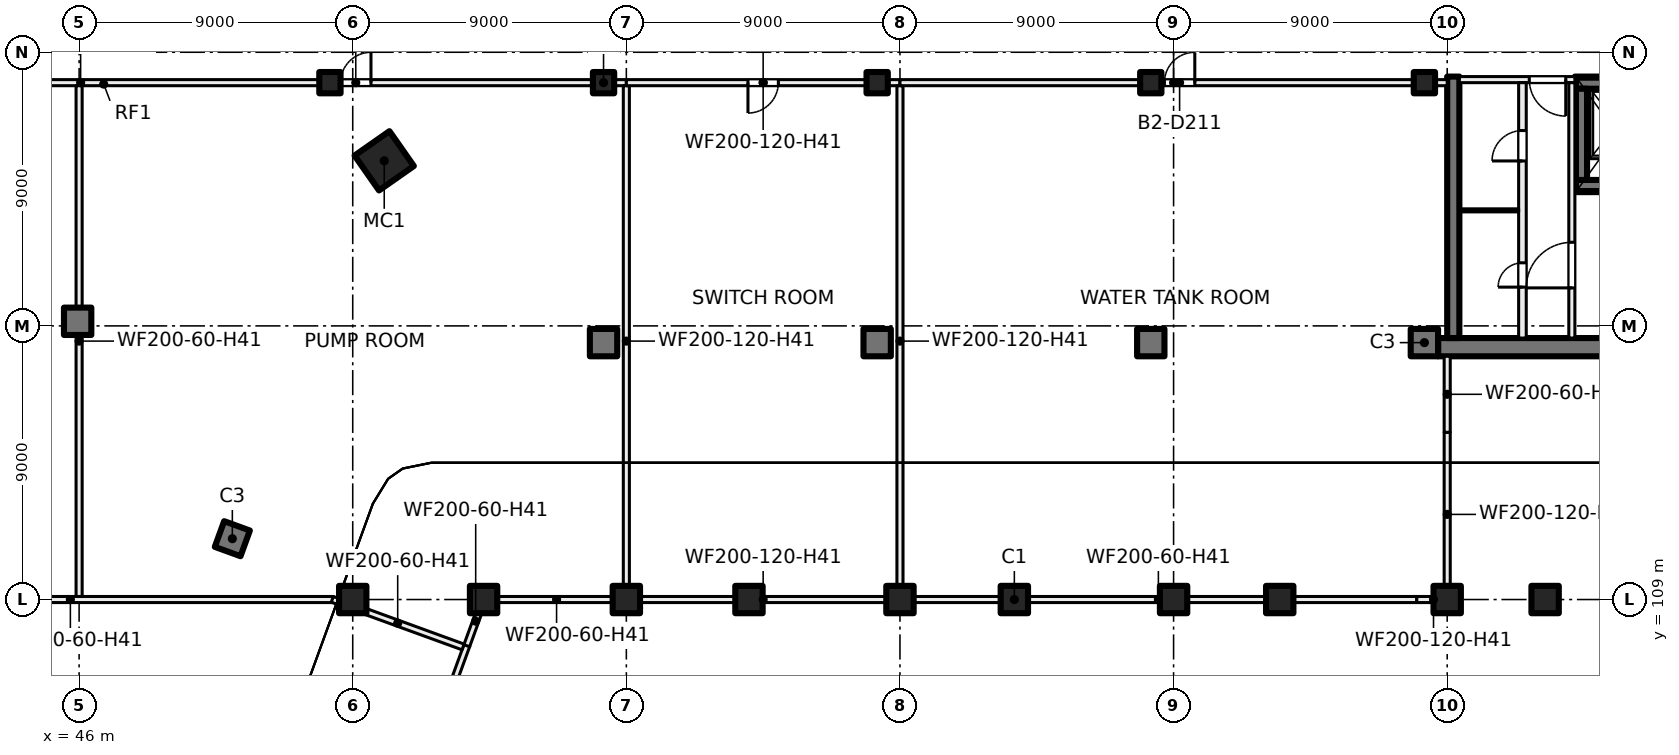
"""IFC4 building model, lengths in metres.
Left out: names, types, materials, properties, quantities, classifications, styles, units other than length and angle.
Written with IfcOpenShell. Run it as: python <this file> out.ifc"""

import sys

from ifc_helpers import new_model, si_unit, direction, frame, frame_2d, origin, origin_2d, place, context, subcontext, project, spatial, rectangle, hollow_rectangle, extrude, element, fill, save


model = new_model("IFC4")
c1 = context("Model", 3, precision=1e-05, world=origin(), true_north=direction((0.0, 1.0)))
c2 = subcontext(c1, "Body", "Model", "MODEL_VIEW")
j1 = project(units=[si_unit("LENGTHUNIT", "METRE"), si_unit("PLANEANGLEUNIT", "RADIAN")], contexts=[c1])
p1 = place(None, origin())
s1 = spatial("IfcSite", under=j1, at=p1, CompositionType="ELEMENT")
p2 = place(p1, origin())
s2 = spatial("IfcBuilding", under=s1, at=p2, CompositionType="ELEMENT")
p3 = place(p2, frame((0.0, 0.0, -9.0)))
s3 = spatial("IfcBuildingStorey", under=s2, at=p3, CompositionType="ELEMENT", Elevation=-9.0)
for number, where, z_axis, x_axis in (
    (1, (55.0, 109.0, 0.0), (0.0, 0.0, 1.0), (1.0, 0.0, 0.0)),
    (2, (64.0, 109.0, 0.0), (0.0, 0.0, 1.0), (1.0, 0.0, 0.0)),
    (3, (73.0, 109.0, 0.0), (0.0, 0.0, 1.0), (1.0, 0.0, 0.0)),
    (4, (82.0, 109.0, 0.0), (0.0, 0.0, 1.0), (1.0, 0.0, 0.0)),
    (5, (91.0, 109.0, 0.0), (0.0, 0.0, 1.0), (1.0, 0.0, 0.0)),
    (6, (59.304, 109.0, 0.0), (0.0, 0.0, 1.0), (1.0, 0.0, 0.0)),
    (7, (68.033, 109.0, 0.0), (0.0, 0.0, 1.0), (1.0, 0.0, 0.0)),
    (8, (76.762, 109.0, 0.0), (0.0, 0.0, 1.0), (1.0, 0.0, 0.0)),
    (9, (85.491, 109.0, 0.0), (0.0, 0.0, 1.0), (1.0, 0.0, 0.0)),
    (10, (94.221, 109.0, 0.0), (0.0, 0.0, 1.0), (1.0, 0.0, 0.0)),
):
    element("IfcColumn", number, at=place(p3, frame(where, z_axis=z_axis, x_axis=x_axis)), inside=s3, PredefinedType="COLUMN", context=c2, shape_type="SweptSolid", body=[
        extrude(rectangle(XDim=0.9, YDim=0.9, at=origin_2d()), origin(), (0.0, 0.0, 1.0), 4.5),
    ])
p4 = place(p3, frame((56.036, 123.43, 0.0), z_axis=(0.0, 0.0, 1.0), x_axis=(0.573576436351, -0.819152044289, 0.0)))
e11 = element("IfcColumn", 11, at=p4, inside=s3, PredefinedType="COLUMN", context=c2, shape_type="SweptSolid", body=[
    extrude(hollow_rectangle(XDim=1.4, YDim=1.4, WallThickness=0.04, at=origin_2d()), origin(), (0.0, 0.0, 1.0), 4.5),
])
for number, where, z_axis, x_axis in (
    (12, (54.25, 126.0, 0.0), (0.0, 0.0, 1.0), (1.0, 0.0, 0.0)),
    (13, (63.25, 126.0, 0.0), (0.0, 0.0, 1.0), (1.0, 0.0, 0.0)),
    (14, (72.25, 126.0, 0.0), (0.0, 0.0, 1.0), (1.0, 0.0, 0.0)),
    (15, (81.25, 126.0, 0.0), (0.0, 0.0, 1.0), (1.0, 0.0, 0.0)),
    (16, (90.25, 126.0, 0.0), (0.0, 0.0, 1.0), (1.0, 0.0, 0.0)),
):
    element("IfcColumn", number, at=place(p3, frame(where, z_axis=z_axis, x_axis=x_axis)), inside=s3, PredefinedType="COLUMN", context=c2, shape_type="SweptSolid", body=[
        extrude(rectangle(XDim=0.7, YDim=0.7, at=origin_2d()), origin(), (0.0, 0.0, 1.0), 4.5),
    ])
for number, where, z_axis, x_axis in (
    (17, (45.952, 118.152, 0.0), (0.0, 0.0, 1.0), (1.0, 0.0, 0.0)),
    (18, (63.25, 117.45, 0.0), (0.0, 0.0, 1.0), (1.0, 0.0, 0.0)),
    (19, (72.25, 117.45, 0.0), (0.0, 0.0, 1.0), (1.0, 0.0, 0.0)),
    (20, (81.25, 117.45, 0.0), (0.0, 0.0, 1.0), (1.0, 0.0, 0.0)),
    (21, (90.25, 117.45, 0.0), (0.0, 0.0, 1.0), (1.0, 0.0, 0.0)),
    (22, (51.04, 111.001, 0.0), (0.0, 0.0, 1.0), (-0.342, -0.94, 0.0)),
):
    element("IfcColumn", number, at=place(p3, frame(where, z_axis=z_axis, x_axis=x_axis)), inside=s3, PredefinedType="COLUMN", context=c2, shape_type="SweptSolid", body=[
        extrude(rectangle(XDim=0.9, YDim=0.9, at=origin_2d()), origin(), (0.0, 0.0, 1.0), 4.5),
    ])
p5 = place(p3, frame((99.6, 117.3, 0.0), z_axis=(0.0, 0.0, 1.0), x_axis=(-1.0, 0.0, 0.0)))
e23 = element("IfcWall", 23, at=p5, inside=s3, PredefinedType="SHEAR", context=c2, shape_type="SweptSolid", body=[
    extrude(rectangle(XDim=8.9, YDim=0.6, at=frame_2d((4.45, 0.0))), origin(), (0.0, 0.0, 1.0), 4.5),
])
p6 = place(p3, frame((107.4, 126.0, 0.0), z_axis=(0.0, 0.0, 1.0), x_axis=(-1.0, 0.0, 0.0)))
e24 = element("IfcWall", 24, at=p6, inside=s3, PredefinedType="SHEAR", context=c2, shape_type="SweptSolid", body=[
    extrude(rectangle(XDim=12.2, YDim=0.4, at=frame_2d((6.1, 0.0))), origin(), (0.0, 0.0, 1.0), 4.5),
])
p7 = place(p6, frame((10.25, 0.0, 0.0)))
e25 = element("IfcOpeningElement", 25, at=p7, cuts=e24, PredefinedType="OPENING", context=c2, shape_type="SweptSolid", body=[
    extrude(rectangle(XDim=1.1, YDim=2.1, at=frame_2d((0.55, 1.05))), frame((0.0, 0.21, 0.0), z_axis=(0.0, -1.0, 0.0), x_axis=(1.0, 0.0, 0.0)), (0.0, 0.0, 1.0), 0.42),
])
p8 = place(p6, frame((0.7, 0.0, 0.0)))
e26 = element("IfcOpeningElement", 26, at=p8, cuts=e24, PredefinedType="OPENING", context=c2, shape_type="SweptSolid", body=[
    extrude(rectangle(XDim=0.8, YDim=2.1, at=frame_2d((0.4, 1.05))), frame((0.0, 0.21, 0.0), z_axis=(0.0, -1.0, 0.0), x_axis=(1.0, 0.0, 0.0)), (0.0, 0.0, 1.0), 0.42),
])
p9 = place(p6, frame((5.6, 0.0, 0.0)))
e27 = element("IfcOpeningElement", 27, at=p9, cuts=e24, PredefinedType="OPENING", context=c2, shape_type="SweptSolid", body=[
    extrude(rectangle(XDim=0.8, YDim=2.1, at=frame_2d((0.4, 1.05))), frame((0.0, 0.21, 0.0), z_axis=(0.0, -1.0, 0.0), x_axis=(1.0, 0.0, 0.0)), (0.0, 0.0, 1.0), 0.42),
])
p10 = place(p3, frame((107.4, 122.6, 0.0), z_axis=(0.0, 0.0, 1.0), x_axis=(-1.0, 0.0, 0.0)))
e28 = element("IfcWall", 28, at=p10, inside=s3, PredefinedType="SHEAR", context=c2, shape_type="SweptSolid", body=[
    extrude(rectangle(XDim=12.2, YDim=0.4, at=frame_2d((6.1, 0.0))), origin(), (0.0, 0.0, 1.0), 4.5),
])
p11 = place(p3, frame((95.4, 125.8, 0.0), z_axis=(0.0, 0.0, 1.0), x_axis=(0.0, -1.0, 0.0)))
e29 = element("IfcWall", 29, at=p11, inside=s3, PredefinedType="SHEAR", context=c2, shape_type="SweptSolid", body=[
    extrude(rectangle(XDim=3.0, YDim=0.4, at=frame_2d((1.5, 0.0))), origin(), (0.0, 0.0, 1.0), 4.5),
])
p12 = place(p3, frame((91.2, 126.2, 0.0), z_axis=(0.0, 0.0, 1.0), x_axis=(0.0, -1.0, 0.0)))
e30 = element("IfcWall", 30, at=p12, inside=s3, PredefinedType="SHEAR", context=c2, shape_type="SweptSolid", body=[
    extrude(rectangle(XDim=8.6, YDim=0.4, at=frame_2d((4.3, 0.0))), origin(), (0.0, 0.0, 1.0), 4.5),
])
p13 = place(p3, frame((95.2, 126.1, 0.0), z_axis=(0.0, 0.0, 1.0), x_axis=(-1.0, 0.0, 0.0)))
e31 = element("IfcWall", 31, at=p13, inside=s3, PredefinedType="PARTITIONING", context=c2, shape_type="SweptSolid", body=[
    extrude(rectangle(XDim=3.8, YDim=0.2, at=frame_2d((1.9, 0.0))), origin(), (0.0, 0.0, 1.0), 4.125),
])
p14 = place(p13, frame((0.3, 0.0, 0.0)))
e32 = element("IfcOpeningElement", 32, at=p14, cuts=e31, PredefinedType="OPENING", context=c2, shape_type="SweptSolid", body=[
    extrude(rectangle(XDim=1.2, YDim=2.1, at=frame_2d((0.6, 1.05))), frame((0.0, 0.11, 0.0), z_axis=(0.0, -1.0, 0.0), x_axis=(1.0, 0.0, 0.0)), (0.0, 0.0, 1.0), 0.22),
])
p15 = place(p3, frame((95.1, 117.6, 0.0), z_axis=(0.0, 0.0, 1.0), x_axis=(0.0, 1.0, 0.0)))
e33 = element("IfcWall", 33, at=p15, inside=s3, PredefinedType="PARTITIONING", context=c2, shape_type="SweptSolid", body=[
    extrude(rectangle(XDim=8.4, YDim=0.2, at=frame_2d((4.2, 0.0))), origin(), (0.0, 0.0, 1.0), 4.125),
])
p16 = place(p15, frame((1.65, 0.0, 0.0)))
e34 = element("IfcOpeningElement", 34, at=p16, cuts=e33, PredefinedType="OPENING", context=c2, shape_type="SweptSolid", body=[
    extrude(rectangle(XDim=1.5, YDim=2.1, at=frame_2d((0.75, 1.05))), frame((0.0, 0.11, 0.0), z_axis=(0.0, -1.0, 0.0), x_axis=(1.0, 0.0, 0.0)), (0.0, 0.0, 1.0), 0.22),
])
p17 = place(p3, frame((93.475, 117.6, 0.0), z_axis=(0.0, 0.0, 1.0), x_axis=(0.0, 1.0, 0.0)))
e35 = element("IfcWall", 35, at=p17, inside=s3, PredefinedType="PARTITIONING", context=c2, shape_type="SweptSolid", body=[
    extrude(rectangle(XDim=8.4, YDim=0.25, at=frame_2d((4.2, 0.0))), origin(), (0.0, 0.0, 1.0), 4.125),
])
p18 = place(p17, frame((5.825, 0.0, 0.0)))
e36 = element("IfcOpeningElement", 36, at=p18, cuts=e35, PredefinedType="OPENING", context=c2, shape_type="SweptSolid", body=[
    extrude(rectangle(XDim=1.0, YDim=2.1, at=frame_2d((0.5, 1.05))), frame((0.0, 0.135, 0.0), z_axis=(0.0, -1.0, 0.0), x_axis=(1.0, 0.0, 0.0)), (0.0, 0.0, 1.0), 0.27),
])
p19 = place(p17, frame((1.675, 0.0, 0.0)))
e37 = element("IfcOpeningElement", 37, at=p19, cuts=e35, PredefinedType="OPENING", context=c2, shape_type="SweptSolid", body=[
    extrude(rectangle(XDim=0.8, YDim=2.1, at=frame_2d((0.4, 1.05))), frame((0.0, 0.135, 0.0), z_axis=(0.0, -1.0, 0.0), x_axis=(1.0, 0.0, 0.0)), (0.0, 0.0, 1.0), 0.27),
])
p20 = place(p3, frame((93.35, 121.8, 0.0), z_axis=(0.0, 0.0, 1.0), x_axis=(-1.0, 0.0, 0.0)))
e38 = element("IfcWall", 38, at=p20, inside=s3, PredefinedType="PARTITIONING", context=c2, shape_type="SweptSolid", body=[
    extrude(rectangle(XDim=1.95, YDim=0.1, at=frame_2d((0.975, 0.0))), origin(), (0.0, 0.0, 1.0), 4.125),
])
p21 = place(p3, frame((64.0, 126.0, 0.0), z_axis=(0.0, 0.0, 1.0), x_axis=(-1.0, 0.0, 0.0)))
e39 = element("IfcWall", 39, at=p21, inside=s3, PredefinedType="PARTITIONING", context=c2, shape_type="SweptSolid", body=[
    extrude(rectangle(XDim=35.9, YDim=0.2, at=frame_2d((17.95, 0.0))), origin(), (0.0, 0.0, 1.0), 4.125),
])
p22 = place(p21, frame((23.498, 0.0, 0.0)))
e40 = element("IfcOpeningElement", 40, at=p22, cuts=e39, PredefinedType="OPENING", context=c2, shape_type="SweptSolid", body=[
    extrude(rectangle(XDim=1.0, YDim=2.1, at=frame_2d((0.5, 1.05))), frame((0.0, 0.11, 0.0), z_axis=(0.0, -1.0, 0.0), x_axis=(1.0, 0.0, 0.0)), (0.0, 0.0, 1.0), 0.22),
])
p23 = place(p21, frame((8.4, 0.0, 0.0)))
e41 = element("IfcOpeningElement", 41, at=p23, cuts=e39, PredefinedType="OPENING", context=c2, shape_type="SweptSolid", body=[
    extrude(rectangle(XDim=1.0, YDim=2.1, at=frame_2d((0.5, 1.05))), frame((0.0, 0.11, 0.0), z_axis=(0.0, -1.0, 0.0), x_axis=(1.0, 0.0, 0.0)), (0.0, 0.0, 1.0), 0.22),
])
p24 = place(p3, frame((37.062, 109.0, 0.0), z_axis=(0.0, 0.0, 1.0), x_axis=(1.0, 0.0, 0.0)))
e42 = element("IfcWall", 42, at=p24, inside=s3, PredefinedType="PARTITIONING", context=c2, shape_type="SweptSolid", body=[
    extrude(rectangle(XDim=17.301, YDim=0.2, at=frame_2d((8.65, 0.0))), origin(), (0.0, 0.0, 1.0), 4.125),
])
p25 = place(p3, frame((46.0, 109.1, 0.0), z_axis=(0.0, 0.0, 1.0), x_axis=(0.0, 1.0, 0.0)))
e43 = element("IfcWall", 43, at=p25, inside=s3, PredefinedType="PARTITIONING", context=c2, shape_type="SweptSolid", body=[
    extrude(rectangle(XDim=16.8, YDim=0.2, at=frame_2d((8.4, 0.0))), origin(), (0.0, 0.0, 1.0), 4.125),
])
p26 = place(p3, frame((54.0, 94.429, 0.0), z_axis=(0.0, 0.0, 1.0), x_axis=(0.342057301943, 0.939679095323, 0.0)))
e44 = element("IfcWall", 44, at=p26, inside=s3, PredefinedType="PARTITIONING", context=c2, shape_type="SweptSolid", body=[
    extrude(rectangle(XDim=13.91, YDim=0.2, at=frame_2d((6.955, 0.0))), origin(), (0.0, 0.0, 1.0), 4.125),
])
p27 = place(p3, frame((54.328, 109.006, 0.0), z_axis=(0.0, 0.0, 1.0), x_axis=(0.939667244136, -0.342089857053, 0.0)))
e45 = element("IfcWall", 45, at=p27, inside=s3, PredefinedType="PARTITIONING", context=c2, shape_type="SweptSolid", body=[
    extrude(rectangle(XDim=4.578, YDim=0.2, at=frame_2d((2.289, 0.0))), origin(), (0.0, 0.0, 1.0), 4.125),
])
p28 = place(p3, frame((58.751, 107.481, 0.0), z_axis=(0.0, 0.0, 1.0), x_axis=(0.341925778056, 0.93972696157, 0.0)))
e46 = element("IfcWall", 46, at=p28, inside=s3, PredefinedType="PARTITIONING", context=c2, shape_type="SweptSolid", body=[
    extrude(rectangle(XDim=1.717, YDim=0.2, at=frame_2d((0.858, 0.0))), origin(), (0.0, 0.0, 1.0), 4.125),
])
p29 = place(p3, frame((59.41, 109.0, 0.0), z_axis=(0.0, 0.0, 1.0), x_axis=(1.0, 0.0, 0.0)))
e47 = element("IfcWall", 47, at=p29, inside=s3, PredefinedType="PARTITIONING", context=c2, shape_type="SweptSolid", body=[
    extrude(rectangle(XDim=4.59, YDim=0.2, at=frame_2d((2.295, 0.0))), origin(), (0.0, 0.0, 1.0), 4.125),
])
p30 = place(p3, frame((64.0, 109.1, 0.0), z_axis=(0.0, 0.0, 1.0), x_axis=(0.0, 1.0, 0.0)))
e48 = element("IfcWall", 48, at=p30, inside=s3, PredefinedType="PARTITIONING", context=c2, shape_type="SweptSolid", body=[
    extrude(rectangle(XDim=16.8, YDim=0.2, at=frame_2d((8.4, 0.0))), origin(), (0.0, 0.0, 1.0), 4.125),
])
p31 = place(p3, frame((64.0, 109.0, 0.0), z_axis=(0.0, 0.0, 1.0), x_axis=(1.0, 0.0, 0.0)))
e49 = element("IfcWall", 49, at=p31, inside=s3, PredefinedType="PARTITIONING", context=c2, shape_type="SweptSolid", body=[
    extrude(rectangle(XDim=9.0, YDim=0.2, at=frame_2d((4.5, 0.0))), origin(), (0.0, 0.0, 1.0), 4.125),
])
p32 = place(p3, frame((73.0, 126.0, 0.0), z_axis=(0.0, 0.0, 1.0), x_axis=(-1.0, 0.0, 0.0)))
e50 = element("IfcWall", 50, at=p32, inside=s3, PredefinedType="PARTITIONING", context=c2, shape_type="SweptSolid", body=[
    extrude(rectangle(XDim=9.0, YDim=0.2, at=frame_2d((4.5, 0.0))), origin(), (0.0, 0.0, 1.0), 4.125),
])
p33 = place(p32, frame((4.0, 0.0, 0.0)))
e51 = element("IfcOpeningElement", 51, at=p33, cuts=e50, PredefinedType="OPENING", context=c2, shape_type="SweptSolid", body=[
    extrude(rectangle(XDim=1.0, YDim=2.1, at=frame_2d((0.5, 1.05))), frame((0.0, 0.11, 0.0), z_axis=(0.0, -1.0, 0.0), x_axis=(1.0, 0.0, 0.0)), (0.0, 0.0, 1.0), 0.22),
])
p34 = place(p3, frame((73.0, 109.1, 0.0), z_axis=(0.0, 0.0, 1.0), x_axis=(0.0, 1.0, 0.0)))
e52 = element("IfcWall", 52, at=p34, inside=s3, PredefinedType="PARTITIONING", context=c2, shape_type="SweptSolid", body=[
    extrude(rectangle(XDim=16.8, YDim=0.2, at=frame_2d((8.4, 0.0))), origin(), (0.0, 0.0, 1.0), 4.125),
])
p35 = place(p3, frame((73.0, 109.0, 0.0), z_axis=(0.0, 0.0, 1.0), x_axis=(1.0, 0.0, 0.0)))
e53 = element("IfcWall", 53, at=p35, inside=s3, PredefinedType="PARTITIONING", context=c2, shape_type="SweptSolid", body=[
    extrude(rectangle(XDim=17.0, YDim=0.2, at=frame_2d((8.5, 0.0))), origin(), (0.0, 0.0, 1.0), 4.125),
])
p36 = place(p3, frame((91.0, 126.0, 0.0), z_axis=(0.0, 0.0, 1.0), x_axis=(-1.0, 0.0, 0.0)))
e54 = element("IfcWall", 54, at=p36, inside=s3, PredefinedType="PARTITIONING", context=c2, shape_type="SweptSolid", body=[
    extrude(rectangle(XDim=18.0, YDim=0.2, at=frame_2d((9.0, 0.0))), origin(), (0.0, 0.0, 1.0), 4.125),
])
p37 = place(p36, frame((8.302, 0.0, 0.0)))
e55 = element("IfcOpeningElement", 55, at=p37, cuts=e54, PredefinedType="OPENING", context=c2, shape_type="SweptSolid", body=[
    extrude(rectangle(XDim=1.0, YDim=2.1, at=frame_2d((0.5, 1.05))), frame((0.0, 0.11, 0.0), z_axis=(0.0, -1.0, 0.0), x_axis=(1.0, 0.0, 0.0)), (0.0, 0.0, 1.0), 0.22),
])
p38 = place(p3, frame((90.0, 109.0, 0.0), z_axis=(0.0, 0.0, 1.0), x_axis=(1.0, 0.0, 0.0)))
e56 = element("IfcWall", 56, at=p38, inside=s3, PredefinedType="PARTITIONING", context=c2, shape_type="SweptSolid", body=[
    extrude(rectangle(XDim=1.1, YDim=0.2, at=frame_2d((0.55, 0.0))), origin(), (0.0, 0.0, 1.0), 4.125),
])
p39 = place(p3, frame((91.0, 109.1, 0.0), z_axis=(0.0, 0.0, 1.0), x_axis=(0.0, 1.0, 0.0)))
e57 = element("IfcWall", 57, at=p39, inside=s3, PredefinedType="PARTITIONING", context=c2, shape_type="SweptSolid", body=[
    extrude(rectangle(XDim=5.4, YDim=0.2, at=frame_2d((2.7, 0.0))), origin(), (0.0, 0.0, 1.0), 4.125),
])
p40 = place(p3, frame((91.0, 114.5, 0.0), z_axis=(0.0, 0.0, 1.0), x_axis=(0.0, 1.0, 0.0)))
e58 = element("IfcWall", 58, at=p40, inside=s3, PredefinedType="PARTITIONING", context=c2, shape_type="SweptSolid", body=[
    extrude(rectangle(XDim=2.5, YDim=0.2, at=frame_2d((1.25, 0.0))), origin(), (0.0, 0.0, 1.0), 4.125),
])
p41 = place(p14, origin())
e59 = element("IfcDoor", 59, at=p41, inside=s3, OperationType="DOUBLE_DOOR_SINGLE_SWING", PredefinedType="DOOR", context=c2, shape_type="SweptSolid", body=[
    extrude(rectangle(XDim=1.2, YDim=2.1, at=frame_2d((0.6, 1.05))), frame((0.0, 0.025, 0.0), z_axis=(0.0, -1.0, 0.0), x_axis=(1.0, 0.0, 0.0)), (0.0, 0.0, 1.0), 0.05),
])
fill(e32, e59)
p42 = place(p16, origin())
e60 = element("IfcDoor", 60, at=p42, inside=s3, OperationType="DOUBLE_DOOR_SINGLE_SWING", PredefinedType="DOOR", context=c2, shape_type="SweptSolid", body=[
    extrude(rectangle(XDim=1.5, YDim=2.1, at=frame_2d((0.75, 1.05))), frame((0.0, 0.025, 0.0), z_axis=(0.0, -1.0, 0.0), x_axis=(1.0, 0.0, 0.0)), (0.0, 0.0, 1.0), 0.05),
])
fill(e34, e60)
p43 = place(p18, origin())
e61 = element("IfcDoor", 61, at=p43, inside=s3, OperationType="SINGLE_SWING_LEFT", PredefinedType="DOOR", context=c2, shape_type="SweptSolid", body=[
    extrude(rectangle(XDim=1.0, YDim=2.1, at=frame_2d((0.5, 1.05))), frame((0.0, 0.025, 0.0), z_axis=(0.0, -1.0, 0.0), x_axis=(1.0, 0.0, 0.0)), (0.0, 0.0, 1.0), 0.05),
])
fill(e36, e61)
p44 = place(p19, origin())
e62 = element("IfcDoor", 62, at=p44, inside=s3, OperationType="SINGLE_SWING_RIGHT", PredefinedType="DOOR", context=c2, shape_type="SweptSolid", body=[
    extrude(rectangle(XDim=0.8, YDim=2.1, at=frame_2d((0.4, 1.05))), frame((0.0, 0.025, 0.0), z_axis=(0.0, -1.0, 0.0), x_axis=(1.0, 0.0, 0.0)), (0.0, 0.0, 1.0), 0.05),
])
fill(e37, e62)
p45 = place(p23, origin())
e63 = element("IfcDoor", 63, at=p45, inside=s3, OperationType="SINGLE_SWING_LEFT", PredefinedType="DOOR", context=c2, shape_type="SweptSolid", body=[
    extrude(rectangle(XDim=1.0, YDim=2.1, at=frame_2d((0.5, 1.05))), frame((0.0, 0.025, 0.0), z_axis=(0.0, -1.0, 0.0), x_axis=(1.0, 0.0, 0.0)), (0.0, 0.0, 1.0), 0.05),
])
fill(e41, e63)
p46 = place(p33, origin())
e64 = element("IfcDoor", 64, at=p46, inside=s3, OperationType="SINGLE_SWING_RIGHT", PredefinedType="DOOR", context=c2, shape_type="SweptSolid", body=[
    extrude(rectangle(XDim=1.0, YDim=2.1, at=frame_2d((0.5, 1.05))), frame((0.0, 0.025, 0.0), z_axis=(0.0, -1.0, 0.0), x_axis=(1.0, 0.0, 0.0)), (0.0, 0.0, 1.0), 0.05),
])
fill(e51, e64)
p47 = place(p37, origin())
e65 = element("IfcDoor", 65, at=p47, inside=s3, OperationType="SINGLE_SWING_LEFT", PredefinedType="DOOR", context=c2, shape_type="SweptSolid", body=[
    extrude(rectangle(XDim=1.0, YDim=2.1, at=frame_2d((0.5, 1.05))), frame((0.0, 0.025, 0.0), z_axis=(0.0, -1.0, 0.0), x_axis=(1.0, 0.0, 0.0)), (0.0, 0.0, 1.0), 0.05),
])
fill(e55, e65)
save(model, sys.argv[1])
